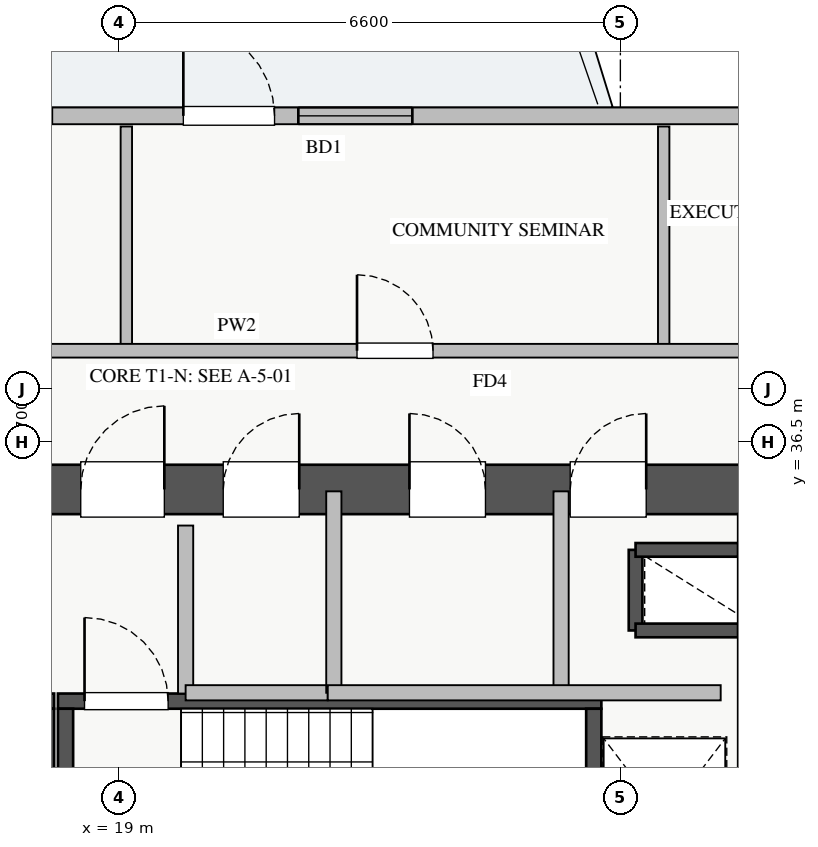
"""IFC4 building model, lengths in metres.
Left out: names, types, materials, properties, quantities, classifications, styles, units other than length and angle.
Written with IfcOpenShell. Run it as: python <this file> out.ifc"""

import sys

from ifc_helpers import new_model, si_unit, direction, frame, frame_2d, origin, place, context, subcontext, project, spatial, rectangle, extrude, source, transform, mapped, element, fill, save


model = new_model("IFC4")
c1 = context("Model", 3, precision=1e-05, world=origin(), true_north=direction((0.0, 1.0)))
c2 = subcontext(c1, "Body", "Model", "MODEL_VIEW")
j1 = project(units=[si_unit("LENGTHUNIT", "METRE"), si_unit("PLANEANGLEUNIT", "RADIAN")], contexts=[c1])
p1 = place(None, origin())
s1 = spatial("IfcSite", under=j1, at=p1, CompositionType="ELEMENT")
p2 = place(p1, origin())
s2 = spatial("IfcBuilding", under=s1, at=p2, CompositionType="ELEMENT")
p3 = place(p2, frame((0.0, 0.0, 147.0)))
s3 = spatial("IfcBuildingStorey", under=s2, at=p3, CompositionType="ELEMENT", Elevation=147.0)
p4 = place(p3, frame((25.8, 34.02, 0.0), z_axis=(0.0, 0.0, 1.0), x_axis=(0.0, 1.0, 0.0)))
e1 = element("IfcWall", 1, at=p4, inside=s3, PredefinedType="SHEAR", context=c2, shape_type="SweptSolid", body=[
    extrude(rectangle(XDim=1.06, YDim=0.18, at=frame_2d((0.53, 0.0))), origin(), (0.0, 0.0, 1.0), 3.07),
])
for number, where, z_axis, x_axis in (
    (2, (25.8, 35.08, 0.0), (0.0, 0.0, 1.0), (1.0, 0.0, 0.0)),
    (3, (25.8, 34.02, 0.0), (0.0, 0.0, 1.0), (1.0, 0.0, 0.0)),
):
    element("IfcWall", number, at=place(p3, frame(where, z_axis=z_axis, x_axis=x_axis)), inside=s3, PredefinedType="SHEAR", context=c2, shape_type="SweptSolid", body=[
        extrude(rectangle(XDim=1.35, YDim=0.18, at=frame_2d((0.675, 0.0))), origin(), (0.0, 0.0, 1.0), 3.07),
    ])
p5 = place(p3, frame((10.85, 33.09, 0.0), z_axis=(0.0, 0.0, 1.0), x_axis=(1.0, 0.0, 0.0)))
e4 = element("IfcWall", 4, at=p5, inside=s3, PredefinedType="SHEAR", context=c2, shape_type="SweptSolid", body=[
    extrude(rectangle(XDim=7.3, YDim=0.2, at=frame_2d((3.65, 0.0))), origin(), (0.0, 0.0, 1.0), 3.25),
])
p6 = place(p5, frame((0.35, 0.0, 0.0)))
e5 = element("IfcOpeningElement", 5, at=p6, cuts=e4, PredefinedType="OPENING", context=c2, shape_type="SweptSolid", body=[
    extrude(rectangle(XDim=1.1, YDim=2.05, at=frame_2d((0.55, 1.025))), frame((0.0, 0.11, 0.0), z_axis=(0.0, -1.0, 0.0), x_axis=(1.0, 0.0, 0.0)), (0.0, 0.0, 1.0), 0.22),
])
p7 = place(p3, frame((18.05, 30.05, 0.0), z_axis=(0.0, 0.0, 1.0), x_axis=(0.0, 1.0, 0.0)))
e6 = element("IfcWall", 6, at=p7, inside=s3, PredefinedType="SHEAR", context=c2, shape_type="SweptSolid", body=[
    extrude(rectangle(XDim=2.94, YDim=0.2, at=frame_2d((1.47, 0.0))), origin(), (0.0, 0.0, 1.0), 3.25),
])
p8 = place(p3, frame((18.2, 33.09, 0.0), z_axis=(0.0, 0.0, 1.0), x_axis=(1.0, 0.0, 0.0)))
e7 = element("IfcWall", 7, at=p8, inside=s3, PredefinedType="SHEAR", context=c2, shape_type="SweptSolid", body=[
    extrude(rectangle(XDim=7.15, YDim=0.2, at=frame_2d((3.575, 0.0))), origin(), (0.0, 0.0, 1.0), 3.25),
])
p9 = place(p8, frame((0.35, 0.0, 0.0)))
e8 = element("IfcOpeningElement", 8, at=p9, cuts=e7, PredefinedType="OPENING", context=c2, shape_type="SweptSolid", body=[
    extrude(rectangle(XDim=1.1, YDim=2.05, at=frame_2d((0.55, 1.025))), frame((0.0, 0.11, 0.0), z_axis=(0.0, -1.0, 0.0), x_axis=(1.0, 0.0, 0.0)), (0.0, 0.0, 1.0), 0.22),
])
for number, where, z_axis, x_axis in (
    (9, (18.3, 30.05, 0.0), (0.0, 0.0, 1.0), (0.0, 1.0, 0.0)),
    (10, (25.25, 30.05, 0.0), (0.0, 0.0, 1.0), (0.0, 1.0, 0.0)),
):
    element("IfcWall", number, at=place(p3, frame(where, z_axis=z_axis, x_axis=x_axis)), inside=s3, PredefinedType="SHEAR", context=c2, shape_type="SweptSolid", body=[
        extrude(rectangle(XDim=2.94, YDim=0.2, at=frame_2d((1.47, 0.0))), origin(), (0.0, 0.0, 1.0), 3.25),
    ])
p10 = place(p3, frame((10.2, 35.875, 0.0), z_axis=(0.0, 0.0, 1.0), x_axis=(1.0, 0.0, 0.0)))
e11 = element("IfcWall", 11, at=p10, inside=s3, PredefinedType="SHEAR", context=c2, shape_type="SweptSolid", body=[
    extrude(rectangle(XDim=17.6, YDim=0.65, at=frame_2d((8.8, 0.0))), origin(), (0.0, 0.0, 1.0), 3.25),
])
p11 = place(p10, frame((1.15, 0.0, 0.0)))
e12 = element("IfcOpeningElement", 12, at=p11, cuts=e11, PredefinedType="OPENING", context=c2, shape_type="SweptSolid", body=[
    extrude(rectangle(XDim=1.1, YDim=2.05, at=frame_2d((0.55, 1.025))), frame((0.0, 0.335, 0.0), z_axis=(0.0, -1.0, 0.0), x_axis=(1.0, 0.0, 0.0)), (0.0, 0.0, 1.0), 0.67),
])
p12 = place(p10, frame((8.3, 0.0, 0.0)))
e13 = element("IfcOpeningElement", 13, at=p12, cuts=e11, PredefinedType="OPENING", context=c2, shape_type="SweptSolid", body=[
    extrude(rectangle(XDim=1.1, YDim=2.05, at=frame_2d((0.55, 1.025))), frame((0.0, 0.335, 0.0), z_axis=(0.0, -1.0, 0.0), x_axis=(1.0, 0.0, 0.0)), (0.0, 0.0, 1.0), 0.67),
])
p13 = place(p10, frame((4.9, 0.0, 0.0)))
e14 = element("IfcOpeningElement", 14, at=p13, cuts=e11, PredefinedType="OPENING", context=c2, shape_type="SweptSolid", body=[
    extrude(rectangle(XDim=1.1, YDim=2.05, at=frame_2d((0.55, 1.025))), frame((0.0, 0.335, 0.0), z_axis=(0.0, -1.0, 0.0), x_axis=(1.0, 0.0, 0.0)), (0.0, 0.0, 1.0), 0.67),
])
p14 = place(p10, frame((14.74, 0.0, 0.0)))
e15 = element("IfcOpeningElement", 15, at=p14, cuts=e11, PredefinedType="OPENING", context=c2, shape_type="SweptSolid", body=[
    extrude(rectangle(XDim=1.0, YDim=2.05, at=frame_2d((0.5, 1.025))), frame((0.0, 0.335, 0.0), z_axis=(0.0, -1.0, 0.0), x_axis=(1.0, 0.0, 0.0)), (0.0, 0.0, 1.0), 0.67),
])
p15 = place(p10, frame((10.175, 0.0, 0.0)))
e16 = element("IfcOpeningElement", 16, at=p15, cuts=e11, PredefinedType="OPENING", context=c2, shape_type="SweptSolid", body=[
    extrude(rectangle(XDim=1.0, YDim=2.05, at=frame_2d((0.5, 1.025))), frame((0.0, 0.335, 0.0), z_axis=(0.0, -1.0, 0.0), x_axis=(1.0, 0.0, 0.0)), (0.0, 0.0, 1.0), 0.67),
])
p16 = place(p10, frame((12.625, 0.0, 0.0)))
e17 = element("IfcOpeningElement", 17, at=p16, cuts=e11, PredefinedType="OPENING", context=c2, shape_type="SweptSolid", body=[
    extrude(rectangle(XDim=1.0, YDim=2.05, at=frame_2d((0.5, 1.025))), frame((0.0, 0.335, 0.0), z_axis=(0.0, -1.0, 0.0), x_axis=(1.0, 0.0, 0.0)), (0.0, 0.0, 1.0), 0.67),
])
p17 = place(p3, frame((6.55, 40.79, 0.0), z_axis=(0.0, 0.0, 1.0), x_axis=(1.0, 0.0, 0.0)))
e18 = element("IfcWall", 18, at=p17, inside=s3, PredefinedType="STANDARD", context=c2, shape_type="SweptSolid", body=[
    extrude(rectangle(XDim=24.9, YDim=0.22, at=frame_2d((12.45, 0.0))), origin(), (0.0, 0.0, 1.0), 2.61),
])
p18 = place(p17, frame((13.3, 0.0, 0.0)))
e19 = element("IfcOpeningElement", 19, at=p18, cuts=e18, PredefinedType="OPENING", context=c2, shape_type="SweptSolid", body=[
    extrude(rectangle(XDim=1.2, YDim=2.1, at=frame_2d((0.6, 1.05))), frame((0.0, 0.12, 0.0), z_axis=(0.0, -1.0, 0.0), x_axis=(1.0, 0.0, 0.0)), (0.0, 0.0, 1.0), 0.24),
])
p19 = place(p17, frame((0.357, 0.0, 0.9)))
e20 = element("IfcOpeningElement", 20, at=p19, cuts=e18, PredefinedType="OPENING", context=c2, shape_type="SweptSolid", body=[
    extrude(rectangle(XDim=1.5, YDim=1.5, at=frame_2d((0.75, 0.75))), frame((0.0, 0.12, 0.0), z_axis=(0.0, -1.0, 0.0), x_axis=(1.0, 0.0, 0.0)), (0.0, 0.0, 1.0), 0.24),
])
p20 = place(p17, frame((9.77, 0.0, 0.9)))
e21 = element("IfcOpeningElement", 21, at=p20, cuts=e18, PredefinedType="OPENING", context=c2, shape_type="SweptSolid", body=[
    extrude(rectangle(XDim=1.8, YDim=1.5, at=frame_2d((0.9, 0.75))), frame((0.0, 0.12, 0.0), z_axis=(0.0, -1.0, 0.0), x_axis=(1.0, 0.0, 0.0)), (0.0, 0.0, 1.0), 0.24),
])
p21 = place(p17, frame((14.813, 0.0, 0.9)))
e22 = element("IfcOpeningElement", 22, at=p21, cuts=e18, PredefinedType="OPENING", context=c2, shape_type="SweptSolid", body=[
    extrude(rectangle(XDim=1.5, YDim=1.45, at=frame_2d((0.75, 0.725))), frame((0.0, 0.12, 0.0), z_axis=(0.0, -1.0, 0.0), x_axis=(1.0, 0.0, 0.0)), (0.0, 0.0, 1.0), 0.24),
])
p22 = place(p17, frame((20.738, 0.0, 0.9)))
e23 = element("IfcOpeningElement", 23, at=p22, cuts=e18, PredefinedType="OPENING", context=c2, shape_type="SweptSolid", body=[
    extrude(rectangle(XDim=2.1, YDim=1.48, at=frame_2d((1.05, 0.74))), frame((0.0, 0.12, 0.0), z_axis=(0.0, -1.0, 0.0), x_axis=(1.0, 0.0, 0.0)), (0.0, 0.0, 1.0), 0.24),
])
p23 = place(p17, frame((4.136, 0.0, 0.9)))
e24 = element("IfcOpeningElement", 24, at=p23, cuts=e18, PredefinedType="OPENING", context=c2, shape_type="SweptSolid", body=[
    extrude(rectangle(XDim=2.4, YDim=1.5, at=frame_2d((1.2, 0.75))), frame((0.0, 0.12, 0.0), z_axis=(0.0, -1.0, 0.0), x_axis=(1.0, 0.0, 0.0)), (0.0, 0.0, 1.0), 0.24),
])
p24 = place(p3, frame((19.88, 33.19, 0.0), z_axis=(0.0, 0.0, 1.0), x_axis=(0.0, 1.0, 0.0)))
e25 = element("IfcWall", 25, at=p24, inside=s3, PredefinedType="PARTITIONING", context=c2, shape_type="SweptSolid", body=[
    extrude(rectangle(XDim=2.21, YDim=0.2, at=frame_2d((1.105, 0.0))), origin(), (0.0, 0.0, 1.0), 3.07),
])
p25 = place(p3, frame((24.82, 33.2, 0.0), z_axis=(0.0, 0.0, 1.0), x_axis=(0.0, 1.0, 0.0)))
e26 = element("IfcWall", 26, at=p25, inside=s3, PredefinedType="PARTITIONING", context=c2, shape_type="SweptSolid", body=[
    extrude(rectangle(XDim=2.65, YDim=0.2, at=frame_2d((1.325, 0.0))), origin(), (0.0, 0.0, 1.0), 3.07),
])
p26 = place(p3, frame((19.88, 33.2, 0.0), z_axis=(0.0, 0.0, 1.0), x_axis=(1.0, 0.0, 0.0)))
e27 = element("IfcWall", 27, at=p26, inside=s3, PredefinedType="PARTITIONING", context=c2, shape_type="SweptSolid", body=[
    extrude(rectangle(XDim=1.87, YDim=0.2, at=frame_2d((0.935, 0.0))), origin(), (0.0, 0.0, 1.0), 3.07),
])
p27 = place(p3, frame((21.83, 33.2, 0.0), z_axis=(0.0, 0.0, 1.0), x_axis=(0.0, 1.0, 0.0)))
e28 = element("IfcWall", 28, at=p27, inside=s3, PredefinedType="PARTITIONING", context=c2, shape_type="SweptSolid", body=[
    extrude(rectangle(XDim=2.65, YDim=0.2, at=frame_2d((1.325, 0.0))), origin(), (0.0, 0.0, 1.0), 3.07),
])
p28 = place(p3, frame((21.75, 33.2, 0.0), z_axis=(0.0, 0.0, 1.0), x_axis=(1.0, 0.0, 0.0)))
e29 = element("IfcWall", 29, at=p28, inside=s3, PredefinedType="PARTITIONING", context=c2, shape_type="SweptSolid", body=[
    extrude(rectangle(XDim=5.17, YDim=0.2, at=frame_2d((2.585, 0.0))), origin(), (0.0, 0.0, 1.0), 3.07),
])
p29 = place(p3, frame((19.1, 37.7, 0.0), z_axis=(0.0, 0.0, 1.0), x_axis=(0.0, 1.0, 0.0)))
e30 = element("IfcWall", 30, at=p29, inside=s3, PredefinedType="PARTITIONING", context=c2, shape_type="SweptSolid", body=[
    extrude(rectangle(XDim=2.95, YDim=0.15, at=frame_2d((1.475, 0.0))), origin(), (0.0, 0.0, 1.0), 2.715),
])
p30 = place(p3, frame((26.17, 37.7, 0.0), z_axis=(0.0, 0.0, 1.0), x_axis=(0.0, 1.0, 0.0)))
e31 = element("IfcWall", 31, at=p30, inside=s3, PredefinedType="PARTITIONING", context=c2, shape_type="SweptSolid", body=[
    extrude(rectangle(XDim=2.95, YDim=0.15, at=frame_2d((1.475, 0.0))), origin(), (0.0, 0.0, 1.0), 3.07),
])
p31 = place(p3, frame((8.75, 37.7, 0.0), z_axis=(0.0, 0.0, 1.0), x_axis=(1.0, 0.0, 0.0)))
e32 = element("IfcWall", 32, at=p31, inside=s3, PredefinedType="PARTITIONING", context=c2, shape_type="SweptSolid", body=[
    extrude(rectangle(XDim=23.61, YDim=0.18, at=frame_2d((11.805, 0.0))), origin(), (0.0, 0.0, 1.0), 3.07),
])
p32 = place(p31, frame((2.795, 0.0, 0.0)))
e33 = element("IfcOpeningElement", 33, at=p32, cuts=e32, PredefinedType="OPENING", context=c2, shape_type="SweptSolid", body=[
    extrude(rectangle(XDim=1.0, YDim=2.05, at=frame_2d((0.5, 1.025))), frame((0.0, 0.1, 0.0), z_axis=(0.0, -1.0, 0.0), x_axis=(1.0, 0.0, 0.0)), (0.0, 0.0, 1.0), 0.2),
])
p33 = place(p31, frame((7.97, 0.0, 0.0)))
e34 = element("IfcOpeningElement", 34, at=p33, cuts=e32, PredefinedType="OPENING", context=c2, shape_type="SweptSolid", body=[
    extrude(rectangle(XDim=1.0, YDim=2.05, at=frame_2d((0.5, 1.025))), frame((0.0, 0.1, 0.0), z_axis=(0.0, -1.0, 0.0), x_axis=(1.0, 0.0, 0.0)), (0.0, 0.0, 1.0), 0.2),
])
p34 = place(p31, frame((13.385, 0.0, 0.0)))
e35 = element("IfcOpeningElement", 35, at=p34, cuts=e32, PredefinedType="OPENING", context=c2, shape_type="SweptSolid", body=[
    extrude(rectangle(XDim=1.0, YDim=2.05, at=frame_2d((0.5, 1.025))), frame((0.0, 0.1, 0.0), z_axis=(0.0, -1.0, 0.0), x_axis=(1.0, 0.0, 0.0)), (0.0, 0.0, 1.0), 0.2),
])
p35 = place(p31, frame((19.825, 0.0, 0.0)))
e36 = element("IfcOpeningElement", 36, at=p35, cuts=e32, PredefinedType="OPENING", context=c2, shape_type="SweptSolid", body=[
    extrude(rectangle(XDim=1.0, YDim=2.05, at=frame_2d((0.5, 1.025))), frame((0.0, 0.1, 0.0), z_axis=(0.0, -1.0, 0.0), x_axis=(1.0, 0.0, 0.0)), (0.0, 0.0, 1.0), 0.2),
])
m1 = source(origin(), c2, "Body", "SweptSolid", [
    extrude(rectangle(XDim=1.2, YDim=2.1, at=frame_2d((0.6, 1.05))), frame((0.0, 0.025, 0.0), z_axis=(0.0, -1.0, 0.0), x_axis=(1.0, 0.0, 0.0)), (0.0, 0.0, 1.0), 0.05),
])
p36 = place(p18, origin())
e37 = element("IfcDoor", 37, at=p36, inside=s3, OperationType="SINGLE_SWING_LEFT", PredefinedType="DOOR", context=c2, shape_type="MappedRepresentation", body=[
    mapped(m1, transform((0.0, 0.0, 0.0), x_axis=(1.0, 0.0, 0.0), y_axis=(0.0, 1.0, 0.0), z_axis=(0.0, 0.0, 1.0), scale=1.0)),
])
fill(e19, e37)
m2 = source(origin(), c2, "Body", "SweptSolid", [
    extrude(rectangle(XDim=1.5, YDim=1.45, at=frame_2d((0.75, 0.725))), frame((0.0, 0.03, 0.0), z_axis=(0.0, -1.0, 0.0), x_axis=(1.0, 0.0, 0.0)), (0.0, 0.0, 1.0), 0.06),
])
p37 = place(p21, origin())
e38 = element("IfcWindow", 38, at=p37, inside=s3, PartitioningType="DOUBLE_PANEL_VERTICAL", PredefinedType="WINDOW", context=c2, shape_type="MappedRepresentation", body=[
    mapped(m2, transform((0.0, 0.0, 0.0), x_axis=(1.0, 0.0, 0.0), y_axis=(0.0, 1.0, 0.0), z_axis=(0.0, 0.0, 1.0), scale=1.0)),
])
fill(e22, e38)
m3 = source(origin(), c2, "Body", "SweptSolid", [
    extrude(rectangle(XDim=1.1, YDim=2.05, at=frame_2d((0.55, 1.025))), frame((0.0, 0.025, 0.0), z_axis=(0.0, -1.0, 0.0), x_axis=(1.0, 0.0, 0.0)), (0.0, 0.0, 1.0), 0.05),
])
p38 = place(p12, origin())
e39 = element("IfcDoor", 39, at=p38, inside=s3, OperationType="SINGLE_SWING_RIGHT", PredefinedType="DOOR", context=c2, shape_type="MappedRepresentation", body=[
    mapped(m3, transform((0.0, 0.0, 0.0), x_axis=(1.0, 0.0, 0.0), y_axis=(0.0, 1.0, 0.0), z_axis=(0.0, 0.0, 1.0), scale=1.0)),
])
fill(e13, e39)
p39 = place(p9, origin())
e40 = element("IfcDoor", 40, at=p39, inside=s3, OperationType="SINGLE_SWING_LEFT", PredefinedType="DOOR", context=c2, shape_type="MappedRepresentation", body=[
    mapped(m3, transform((0.0, 0.0, 0.0), x_axis=(1.0, 0.0, 0.0), y_axis=(0.0, 1.0, 0.0), z_axis=(0.0, 0.0, 1.0), scale=1.0)),
])
fill(e8, e40)
m4 = source(origin(), c2, "Body", "SweptSolid", [
    extrude(rectangle(XDim=1.0, YDim=2.05, at=frame_2d((0.5, 1.025))), frame((0.0, 0.025, 0.0), z_axis=(0.0, -1.0, 0.0), x_axis=(1.0, 0.0, 0.0)), (0.0, 0.0, 1.0), 0.05),
])
p40 = place(p14, origin())
e41 = element("IfcDoor", 41, at=p40, inside=s3, OperationType="SINGLE_SWING_RIGHT", PredefinedType="DOOR", context=c2, shape_type="MappedRepresentation", body=[
    mapped(m4, transform((0.0, 0.0, 0.0), x_axis=(1.0, 0.0, 0.0), y_axis=(0.0, 1.0, 0.0), z_axis=(0.0, 0.0, 1.0), scale=1.0)),
])
fill(e15, e41)
p41 = place(p15, origin())
e42 = element("IfcDoor", 42, at=p41, inside=s3, OperationType="SINGLE_SWING_RIGHT", PredefinedType="DOOR", context=c2, shape_type="MappedRepresentation", body=[
    mapped(m4, transform((0.0, 0.0, 0.0), x_axis=(1.0, 0.0, 0.0), y_axis=(0.0, 1.0, 0.0), z_axis=(0.0, 0.0, 1.0), scale=1.0)),
])
fill(e16, e42)
p42 = place(p16, origin())
e43 = element("IfcDoor", 43, at=p42, inside=s3, OperationType="SINGLE_SWING_LEFT", PredefinedType="DOOR", context=c2, shape_type="MappedRepresentation", body=[
    mapped(m4, transform((0.0, 0.0, 0.0), x_axis=(1.0, 0.0, 0.0), y_axis=(0.0, 1.0, 0.0), z_axis=(0.0, 0.0, 1.0), scale=1.0)),
])
fill(e17, e43)
p43 = place(p34, origin())
e44 = element("IfcDoor", 44, at=p43, inside=s3, OperationType="SINGLE_SWING_LEFT", PredefinedType="DOOR", context=c2, shape_type="MappedRepresentation", body=[
    mapped(m4, transform((0.0, 0.0, 0.0), x_axis=(1.0, 0.0, 0.0), y_axis=(0.0, 1.0, 0.0), z_axis=(0.0, 0.0, 1.0), scale=1.0)),
])
fill(e35, e44)
save(model, sys.argv[1])
